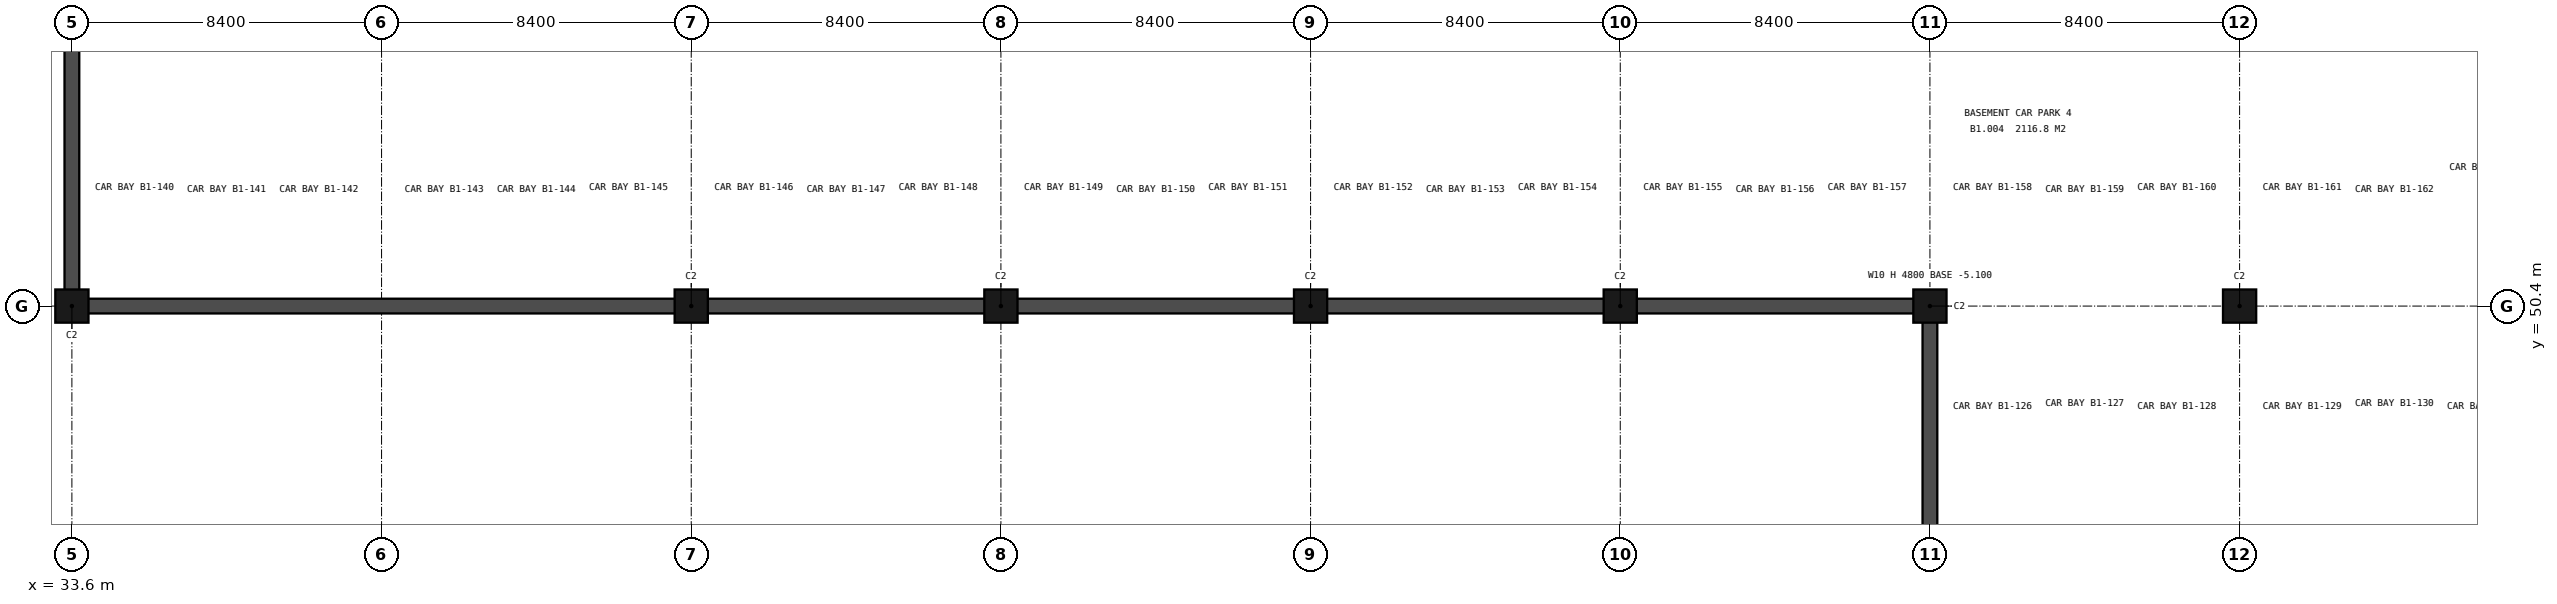
"""IFC4 building model, lengths in metres.
Left out: names, types, materials, properties, quantities, classifications, styles, units other than length and angle.
Written with IfcOpenShell. Run it as: python <this file> out.ifc"""

import sys

from ifc_helpers import new_model, si_unit, direction, frame, frame_2d, origin, origin_2d, place, context, subcontext, project, spatial, rectangle, extrude, element, save


model = new_model("IFC4")
c1 = context("Model", 3, precision=1e-05, world=origin(), true_north=direction((0.0, 1.0)))
c2 = subcontext(c1, "Body", "Model", "MODEL_VIEW")
j1 = project(units=[si_unit("LENGTHUNIT", "METRE"), si_unit("PLANEANGLEUNIT", "RADIAN")], contexts=[c1])
p1 = place(None, origin())
s1 = spatial("IfcSite", under=j1, at=p1, CompositionType="ELEMENT")
p2 = place(p1, origin())
s2 = spatial("IfcBuilding", under=s1, at=p2, CompositionType="ELEMENT")
p3 = place(p2, frame((0.0, 0.0, -4.8)))
s3 = spatial("IfcBuildingStorey", under=s2, at=p3, CompositionType="ELEMENT", Elevation=-4.8)
for number, where, z_axis, x_axis in (
    (1, (33.6, 50.4, -0.3), (0.0, 0.0, 1.0), (1.0, 0.0, 0.0)),
    (2, (50.4, 50.4, -0.3), (0.0, 0.0, 1.0), (1.0, 0.0, 0.0)),
    (3, (58.8, 50.4, -0.3), (0.0, 0.0, 1.0), (1.0, 0.0, 0.0)),
    (4, (67.2, 50.4, -0.3), (0.0, 0.0, 1.0), (1.0, 0.0, 0.0)),
    (5, (75.6, 50.4, -0.3), (0.0, 0.0, 1.0), (1.0, 0.0, 0.0)),
    (6, (84.0, 50.4, -0.3), (0.0, 0.0, 1.0), (1.0, 0.0, 0.0)),
    (7, (92.4, 50.4, -0.3), (0.0, 0.0, 1.0), (1.0, 0.0, 0.0)),
):
    element("IfcColumn", number, at=place(p3, frame(where, z_axis=z_axis, x_axis=x_axis)), inside=s3, PredefinedType="COLUMN", context=c2, shape_type="SweptSolid", body=[
        extrude(rectangle(XDim=0.9, YDim=0.9, at=origin_2d()), origin(), (0.0, 0.0, 1.0), 4.8),
    ])
p4 = place(p3, frame((33.6, 84.2, -0.3), z_axis=(0.0, 0.0, 1.0), x_axis=(0.0, -1.0, 0.0)))
e8 = element("IfcWall", 8, at=p4, inside=s3, PredefinedType="SOLIDWALL", context=c2, shape_type="SweptSolid", body=[
    extrude(rectangle(XDim=34.0, YDim=0.4, at=frame_2d((17.0, 0.0))), origin(), (0.0, 0.0, 1.0), 4.8),
])
for number, where, z_axis, x_axis in (
    (9, (33.4, 50.4, -0.3), (0.0, 0.0, 1.0), (1.0, 0.0, 0.0)),
    (10, (84.0, 50.6, -0.3), (0.0, 0.0, 1.0), (0.0, -1.0, 0.0)),
):
    element("IfcWall", number, at=place(p3, frame(where, z_axis=z_axis, x_axis=x_axis)), inside=s3, PredefinedType="SOLIDWALL", context=c2, shape_type="SweptSolid", body=[
        extrude(rectangle(XDim=50.8, YDim=0.4, at=frame_2d((25.4, 0.0))), origin(), (0.0, 0.0, 1.0), 4.8),
    ])
save(model, sys.argv[1])
